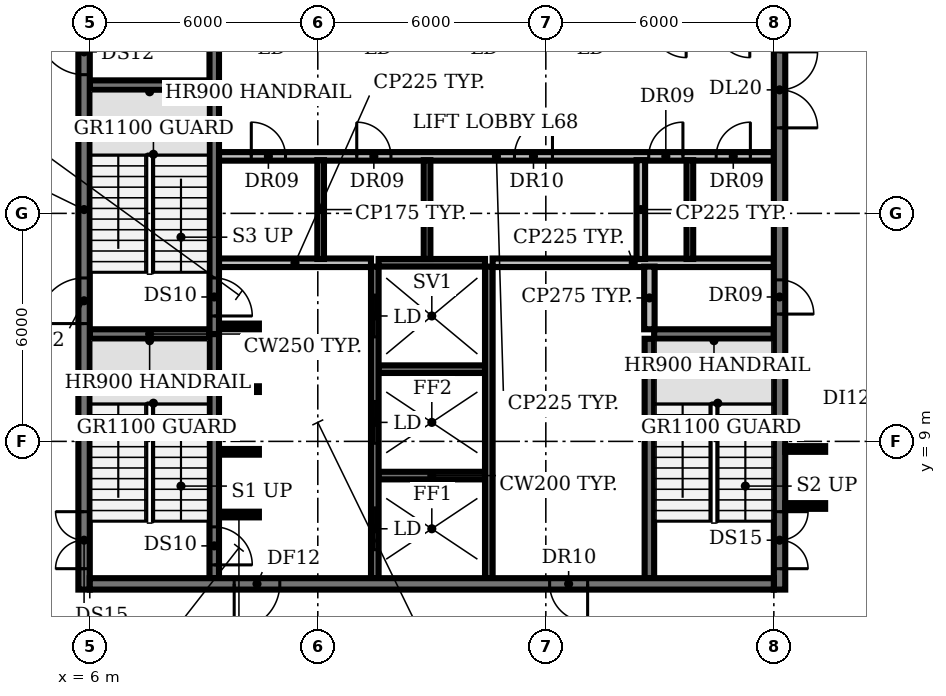
"""IFC4 building model, lengths in metres.
Left out: names, types, materials, properties, quantities, classifications, styles, units other than length and angle.
Written with IfcOpenShell. Run it as: python <this file> out.ifc"""

import sys

from ifc_helpers import new_model, si_unit, direction, frame, frame_2d, origin, place, context, subcontext, project, spatial, rectangle, extrude, element, fill, save


model = new_model("IFC4")
c1 = context("Model", 3, precision=1e-05, world=origin(), true_north=direction((0.0, 1.0)))
c2 = subcontext(c1, "Body", "Model", "MODEL_VIEW")
j1 = project(units=[si_unit("LENGTHUNIT", "METRE"), si_unit("PLANEANGLEUNIT", "RADIAN")], contexts=[c1])
p1 = place(None, origin())
s1 = spatial("IfcSite", under=j1, at=p1, CompositionType="ELEMENT")
p2 = place(p1, origin())
s2 = spatial("IfcBuilding", under=s1, at=p2, CompositionType="ELEMENT")
p3 = place(p2, frame((0.0, 0.0, 306.2)))
s3 = spatial("IfcBuildingStorey", under=s2, at=p3, CompositionType="ELEMENT", Elevation=306.2)
p4 = place(p3, frame((9.4, 7.075, 0.0), z_axis=(0.0, 0.0, 1.0), x_axis=(1.0, 0.0, 0.0)))
e1 = element("IfcWall", 1, at=p4, inside=s3, PredefinedType="SHEAR", context=c2, shape_type="SweptSolid", body=[
    extrude(rectangle(XDim=1.05, YDim=0.15, at=frame_2d((0.525, 0.0))), origin(), (0.0, 0.0, 1.0), 3.85),
])
p5 = place(p3, frame((13.6, 8.1, 0.0), z_axis=(0.0, 0.0, 1.0), x_axis=(1.0, 0.0, 0.0)))
e2 = element("IfcWall", 2, at=p5, inside=s3, PredefinedType="SHEAR", context=c2, shape_type="SweptSolid", body=[
    extrude(rectangle(XDim=2.8, YDim=0.2, at=frame_2d((1.4, 0.0))), origin(), (0.0, 0.0, 1.0), 3.85),
])
for number, where, z_axis, x_axis in (
    (3, (9.4, 8.725, 0.0), (0.0, 0.0, 1.0), (1.0, 0.0, 0.0)),
    (4, (9.4, 10.375, 0.0), (0.0, 0.0, 1.0), (1.0, 0.0, 0.0)),
):
    element("IfcWall", number, at=place(p3, frame(where, z_axis=z_axis, x_axis=x_axis)), inside=s3, PredefinedType="SHEAR", context=c2, shape_type="SweptSolid", body=[
        extrude(rectangle(XDim=1.05, YDim=0.15, at=frame_2d((0.525, 0.0))), origin(), (0.0, 0.0, 1.0), 3.85),
    ])
p6 = place(p3, frame((13.6, 10.9, 0.0), z_axis=(0.0, 0.0, 1.0), x_axis=(1.0, 0.0, 0.0)))
e5 = element("IfcWall", 5, at=p6, inside=s3, PredefinedType="SHEAR", context=c2, shape_type="SweptSolid", body=[
    extrude(rectangle(XDim=2.8, YDim=0.2, at=frame_2d((1.4, 0.0))), origin(), (0.0, 0.0, 1.0), 3.85),
])
for number, where, z_axis, x_axis in (
    (6, (6.0, 11.825, 0.0), (0.0, 0.0, 1.0), (1.0, 0.0, 0.0)),
    (7, (20.85, 11.825, 0.0), (0.0, 0.0, 1.0), (1.0, 0.0, 0.0)),
):
    element("IfcWall", number, at=place(p3, frame(where, z_axis=z_axis, x_axis=x_axis)), inside=s3, PredefinedType="SHEAR", context=c2, shape_type="SweptSolid", body=[
        extrude(rectangle(XDim=3.15, YDim=0.25, at=frame_2d((1.575, 0.0))), origin(), (0.0, 0.0, 1.0), 3.85),
    ])
p7 = place(p3, frame((9.4, 12.025, 0.0), z_axis=(0.0, 0.0, 1.0), x_axis=(1.0, 0.0, 0.0)))
e8 = element("IfcWall", 8, at=p7, inside=s3, PredefinedType="SHEAR", context=c2, shape_type="SweptSolid", body=[
    extrude(rectangle(XDim=1.05, YDim=0.15, at=frame_2d((0.525, 0.0))), origin(), (0.0, 0.0, 1.0), 3.85),
])
p8 = place(p3, frame((9.4, 13.7, 0.0), z_axis=(0.0, 0.0, 1.0), x_axis=(1.0, 0.0, 0.0)))
e9 = element("IfcWall", 9, at=p8, inside=s3, PredefinedType="PARTITIONING", context=c2, shape_type="SweptSolid", body=[
    extrude(rectangle(XDim=4.0, YDim=0.225, at=frame_2d((2.0, 0.0))), origin(), (0.0, 0.0, 1.0), 3.85),
])
p9 = place(p3, frame((13.6, 13.7, 0.0), z_axis=(0.0, 0.0, 1.0), x_axis=(1.0, 0.0, 0.0)))
e10 = element("IfcWall", 10, at=p9, inside=s3, PredefinedType="SHEAR", context=c2, shape_type="SweptSolid", body=[
    extrude(rectangle(XDim=2.8, YDim=0.2, at=frame_2d((1.4, 0.0))), origin(), (0.0, 0.0, 1.0), 3.85),
])
p10 = place(p3, frame((16.6, 13.7, 0.0), z_axis=(0.0, 0.0, 1.0), x_axis=(1.0, 0.0, 0.0)))
e11 = element("IfcWall", 11, at=p10, inside=s3, PredefinedType="PARTITIONING", context=c2, shape_type="SweptSolid", body=[
    extrude(rectangle(XDim=7.4, YDim=0.225, at=frame_2d((3.7, 0.0))), origin(), (0.0, 0.0, 1.0), 3.85),
])
p11 = place(p3, frame((9.4, 16.5, 0.0), z_axis=(0.0, 0.0, 1.0), x_axis=(1.0, 0.0, 0.0)))
e12 = element("IfcWall", 12, at=p11, inside=s3, PredefinedType="PARTITIONING", context=c2, shape_type="SweptSolid", body=[
    extrude(rectangle(XDim=14.6, YDim=0.225, at=frame_2d((7.3, 0.0))), origin(), (0.0, 0.0, 1.0), 3.85),
])
p12 = place(p11, frame((0.85, 0.0, 0.0)))
e13 = element("IfcOpeningElement", 13, at=p12, cuts=e12, PredefinedType="OPENING", context=c2, shape_type="SweptSolid", body=[
    extrude(rectangle(XDim=0.9, YDim=2.1, at=frame_2d((0.45, 1.05))), frame((0.0, 0.123, 0.0), z_axis=(0.0, -1.0, 0.0), x_axis=(1.0, 0.0, 0.0)), (0.0, 0.0, 1.0), 0.245),
])
p13 = place(p11, frame((3.625, 0.0, 0.0)))
e14 = element("IfcOpeningElement", 14, at=p13, cuts=e12, PredefinedType="OPENING", context=c2, shape_type="SweptSolid", body=[
    extrude(rectangle(XDim=0.9, YDim=2.1, at=frame_2d((0.45, 1.05))), frame((0.0, 0.123, 0.0), z_axis=(0.0, -1.0, 0.0), x_axis=(1.0, 0.0, 0.0)), (0.0, 0.0, 1.0), 0.245),
])
p14 = place(p11, frame((7.775, 0.0, 0.0)))
e15 = element("IfcOpeningElement", 15, at=p14, cuts=e12, PredefinedType="OPENING", context=c2, shape_type="SweptSolid", body=[
    extrude(rectangle(XDim=1.0, YDim=2.1, at=frame_2d((0.5, 1.05))), frame((0.0, 0.123, 0.0), z_axis=(0.0, -1.0, 0.0), x_axis=(1.0, 0.0, 0.0)), (0.0, 0.0, 1.0), 0.245),
])
p15 = place(p11, frame((11.308, 0.0, 0.0)))
e16 = element("IfcOpeningElement", 16, at=p15, cuts=e12, PredefinedType="OPENING", context=c2, shape_type="SweptSolid", body=[
    extrude(rectangle(XDim=0.9, YDim=2.1, at=frame_2d((0.45, 1.05))), frame((0.0, 0.123, 0.0), z_axis=(0.0, -1.0, 0.0), x_axis=(1.0, 0.0, 0.0)), (0.0, 0.0, 1.0), 0.245),
])
p16 = place(p11, frame((13.083, 0.0, 0.0)))
e17 = element("IfcOpeningElement", 17, at=p16, cuts=e12, PredefinedType="OPENING", context=c2, shape_type="SweptSolid", body=[
    extrude(rectangle(XDim=0.9, YDim=2.1, at=frame_2d((0.45, 1.05))), frame((0.0, 0.123, 0.0), z_axis=(0.0, -1.0, 0.0), x_axis=(1.0, 0.0, 0.0)), (0.0, 0.0, 1.0), 0.245),
])
p17 = place(p3, frame((6.0, 18.375, 0.0), z_axis=(0.0, 0.0, 1.0), x_axis=(1.0, 0.0, 0.0)))
e18 = element("IfcWall", 18, at=p17, inside=s3, PredefinedType="SHEAR", context=c2, shape_type="SweptSolid", body=[
    extrude(rectangle(XDim=3.15, YDim=0.25, at=frame_2d((1.575, 0.0))), origin(), (0.0, 0.0, 1.0), 3.85),
])
p18 = place(p3, frame((9.275, 11.825, 0.0), z_axis=(0.0, 0.0, 1.0), x_axis=(0.0, -1.0, 0.0)))
e19 = element("IfcWall", 19, at=p18, inside=s3, PredefinedType="SHEAR", context=c2, shape_type="SweptSolid", body=[
    extrude(rectangle(XDim=6.425, YDim=0.25, at=frame_2d((3.212, 0.0))), origin(), (0.0, 0.0, 1.0), 3.85),
])
p19 = place(p18, frame((5.075, 0.0, 0.0)))
e20 = element("IfcOpeningElement", 20, at=p19, cuts=e19, PredefinedType="OPENING", context=c2, shape_type="SweptSolid", body=[
    extrude(rectangle(XDim=1.0, YDim=2.1, at=frame_2d((0.5, 1.05))), frame((0.0, 0.135, 0.0), z_axis=(0.0, -1.0, 0.0), x_axis=(1.0, 0.0, 0.0)), (0.0, 0.0, 1.0), 0.27),
])
p20 = place(p3, frame((9.275, 18.375, 0.0), z_axis=(0.0, 0.0, 1.0), x_axis=(0.0, -1.0, 0.0)))
e21 = element("IfcWall", 21, at=p20, inside=s3, PredefinedType="SHEAR", context=c2, shape_type="SweptSolid", body=[
    extrude(rectangle(XDim=6.55, YDim=0.25, at=frame_2d((3.275, 0.0))), origin(), (0.0, 0.0, 1.0), 3.85),
])
p21 = place(p20, frame((5.075, 0.0, 0.0)))
e22 = element("IfcOpeningElement", 22, at=p21, cuts=e21, PredefinedType="OPENING", context=c2, shape_type="SweptSolid", body=[
    extrude(rectangle(XDim=1.0, YDim=2.1, at=frame_2d((0.5, 1.05))), frame((0.0, 0.135, 0.0), z_axis=(0.0, -1.0, 0.0), x_axis=(1.0, 0.0, 0.0)), (0.0, 0.0, 1.0), 0.27),
])
p22 = place(p3, frame((9.275, 18.375, 0.0), z_axis=(0.0, 0.0, 1.0), x_axis=(0.0, 1.0, 0.0)))
e23 = element("IfcWall", 23, at=p22, inside=s3, PredefinedType="SHEAR", context=c2, shape_type="SweptSolid", body=[
    extrude(rectangle(XDim=6.425, YDim=0.25, at=frame_2d((3.212, 0.0))), origin(), (0.0, 0.0, 1.0), 3.85),
])
p23 = place(p3, frame((12.075, 13.8, 0.0), z_axis=(0.0, 0.0, 1.0), x_axis=(0.0, 1.0, 0.0)))
e24 = element("IfcWall", 24, at=p23, inside=s3, PredefinedType="PARTITIONING", context=c2, shape_type="SweptSolid", body=[
    extrude(rectangle(XDim=2.6, YDim=0.175, at=frame_2d((1.3, 0.0))), origin(), (0.0, 0.0, 1.0), 3.85),
])
p24 = place(p3, frame((13.5, 5.4, 0.0), z_axis=(0.0, 0.0, 1.0), x_axis=(0.0, 1.0, 0.0)))
e25 = element("IfcWall", 25, at=p24, inside=s3, PredefinedType="SHEAR", context=c2, shape_type="SweptSolid", body=[
    extrude(rectangle(XDim=8.2, YDim=0.2, at=frame_2d((4.1, 0.0))), origin(), (0.0, 0.0, 1.0), 3.85),
])
p25 = place(p24, frame((0.75, 0.0, 0.0)))
e26 = element("IfcOpeningElement", 26, at=p25, cuts=e25, PredefinedType="OPENING", context=c2, shape_type="SweptSolid", body=[
    extrude(rectangle(XDim=1.1, YDim=2.1, at=frame_2d((0.55, 1.05))), frame((0.0, 0.11, 0.0), z_axis=(0.0, -1.0, 0.0), x_axis=(1.0, 0.0, 0.0)), (0.0, 0.0, 1.0), 0.22),
])
p26 = place(p24, frame((3.55, 0.0, 0.0)))
e27 = element("IfcOpeningElement", 27, at=p26, cuts=e25, PredefinedType="OPENING", context=c2, shape_type="SweptSolid", body=[
    extrude(rectangle(XDim=1.1, YDim=2.1, at=frame_2d((0.55, 1.05))), frame((0.0, 0.11, 0.0), z_axis=(0.0, -1.0, 0.0), x_axis=(1.0, 0.0, 0.0)), (0.0, 0.0, 1.0), 0.22),
])
p27 = place(p24, frame((6.35, 0.0, 0.0)))
e28 = element("IfcOpeningElement", 28, at=p27, cuts=e25, PredefinedType="OPENING", context=c2, shape_type="SweptSolid", body=[
    extrude(rectangle(XDim=1.1, YDim=2.1, at=frame_2d((0.55, 1.05))), frame((0.0, 0.11, 0.0), z_axis=(0.0, -1.0, 0.0), x_axis=(1.0, 0.0, 0.0)), (0.0, 0.0, 1.0), 0.22),
])
p28 = place(p3, frame((14.875, 13.8, 0.0), z_axis=(0.0, 0.0, 1.0), x_axis=(0.0, 1.0, 0.0)))
e29 = element("IfcWall", 29, at=p28, inside=s3, PredefinedType="PARTITIONING", context=c2, shape_type="SweptSolid", body=[
    extrude(rectangle(XDim=2.6, YDim=0.175, at=frame_2d((1.3, 0.0))), origin(), (0.0, 0.0, 1.0), 3.85),
])
p29 = place(p3, frame((16.5, 5.4, 0.0), z_axis=(0.0, 0.0, 1.0), x_axis=(0.0, 1.0, 0.0)))
e30 = element("IfcWall", 30, at=p29, inside=s3, PredefinedType="SHEAR", context=c2, shape_type="SweptSolid", body=[
    extrude(rectangle(XDim=8.2, YDim=0.2, at=frame_2d((4.1, 0.0))), origin(), (0.0, 0.0, 1.0), 3.85),
])
p30 = place(p3, frame((20.5, 13.8, 0.0), z_axis=(0.0, 0.0, 1.0), x_axis=(0.0, 1.0, 0.0)))
e31 = element("IfcWall", 31, at=p30, inside=s3, PredefinedType="PARTITIONING", context=c2, shape_type="SweptSolid", body=[
    extrude(rectangle(XDim=2.6, YDim=0.225, at=frame_2d((1.3, 0.0))), origin(), (0.0, 0.0, 1.0), 3.85),
])
p31 = place(p3, frame((20.725, 5.4, 0.0), z_axis=(0.0, 0.0, 1.0), x_axis=(0.0, 1.0, 0.0)))
e32 = element("IfcWall", 32, at=p31, inside=s3, PredefinedType="SHEAR", context=c2, shape_type="SweptSolid", body=[
    extrude(rectangle(XDim=6.3, YDim=0.25, at=frame_2d((3.15, 0.0))), origin(), (0.0, 0.0, 1.0), 3.85),
])
p32 = place(p3, frame((20.725, 11.95, 0.0), z_axis=(0.0, 0.0, 1.0), x_axis=(0.0, 1.0, 0.0)))
e33 = element("IfcWall", 33, at=p32, inside=s3, PredefinedType="PARTITIONING", context=c2, shape_type="SweptSolid", body=[
    extrude(rectangle(XDim=1.65, YDim=0.275, at=frame_2d((0.825, 0.0))), origin(), (0.0, 0.0, 1.0), 3.85),
])
p33 = place(p3, frame((21.79, 13.8, 0.0), z_axis=(0.0, 0.0, 1.0), x_axis=(0.0, 1.0, 0.0)))
e34 = element("IfcWall", 34, at=p33, inside=s3, PredefinedType="PARTITIONING", context=c2, shape_type="SweptSolid", body=[
    extrude(rectangle(XDim=2.6, YDim=0.175, at=frame_2d((1.3, 0.0))), origin(), (0.0, 0.0, 1.0), 3.85),
])
p34 = place(p3, frame((5.85, 5.1, 0.0), z_axis=(0.0, 0.0, 1.0), x_axis=(0.0, 1.0, 0.0)))
e35 = element("IfcWall", 35, at=p34, inside=s3, PredefinedType="SHEAR", context=c2, shape_type="SweptSolid", body=[
    extrude(rectangle(XDim=20.0, YDim=0.3, at=frame_2d((10.0, 0.0))), origin(), (0.0, 0.0, 1.0), 3.85),
])
p35 = place(p34, frame((0.55, 0.0, 0.0)))
e36 = element("IfcOpeningElement", 36, at=p35, cuts=e35, PredefinedType="OPENING", context=c2, shape_type="SweptSolid", body=[
    extrude(rectangle(XDim=1.5, YDim=2.1, at=frame_2d((0.75, 1.05))), frame((0.0, 0.16, 0.0), z_axis=(0.0, -1.0, 0.0), x_axis=(1.0, 0.0, 0.0)), (0.0, 0.0, 1.0), 0.32),
])
p36 = place(p34, frame((7.0, 0.0, 0.0)))
e37 = element("IfcOpeningElement", 37, at=p36, cuts=e35, PredefinedType="OPENING", context=c2, shape_type="SweptSolid", body=[
    extrude(rectangle(XDim=1.2, YDim=2.1, at=frame_2d((0.6, 1.05))), frame((0.0, 0.16, 0.0), z_axis=(0.0, -1.0, 0.0), x_axis=(1.0, 0.0, 0.0)), (0.0, 0.0, 1.0), 0.32),
])
p37 = place(p34, frame((13.55, 0.0, 0.0)))
e38 = element("IfcOpeningElement", 38, at=p37, cuts=e35, PredefinedType="OPENING", context=c2, shape_type="SweptSolid", body=[
    extrude(rectangle(XDim=1.2, YDim=2.1, at=frame_2d((0.6, 1.05))), frame((0.0, 0.16, 0.0), z_axis=(0.0, -1.0, 0.0), x_axis=(1.0, 0.0, 0.0)), (0.0, 0.0, 1.0), 0.32),
])
p38 = place(p3, frame((24.15, 25.655, 0.0), z_axis=(0.0, 0.0, 1.0), x_axis=(0.0, -1.0, 0.0)))
e39 = element("IfcWall", 39, at=p38, inside=s3, PredefinedType="SHEAR", context=c2, shape_type="SweptSolid", body=[
    extrude(rectangle(XDim=20.555, YDim=0.3, at=frame_2d((10.277, 0.0))), origin(), (0.0, 0.0, 1.0), 3.85),
])
p39 = place(p38, frame((18.505, 0.0, 0.0)))
e40 = element("IfcOpeningElement", 40, at=p39, cuts=e39, PredefinedType="OPENING", context=c2, shape_type="SweptSolid", body=[
    extrude(rectangle(XDim=1.5, YDim=2.1, at=frame_2d((0.75, 1.05))), frame((0.0, 0.16, 0.0), z_axis=(0.0, -1.0, 0.0), x_axis=(1.0, 0.0, 0.0)), (0.0, 0.0, 1.0), 0.32),
])
p40 = place(p38, frame((12.405, 0.0, 0.0)))
e41 = element("IfcOpeningElement", 41, at=p40, cuts=e39, PredefinedType="OPENING", context=c2, shape_type="SweptSolid", body=[
    extrude(rectangle(XDim=0.9, YDim=2.1, at=frame_2d((0.45, 1.05))), frame((0.0, 0.16, 0.0), z_axis=(0.0, -1.0, 0.0), x_axis=(1.0, 0.0, 0.0)), (0.0, 0.0, 1.0), 0.32),
])
p41 = place(p38, frame((6.405, 0.0, 0.0)))
e42 = element("IfcOpeningElement", 42, at=p41, cuts=e39, PredefinedType="OPENING", context=c2, shape_type="SweptSolid", body=[
    extrude(rectangle(XDim=2.0, YDim=2.1, at=frame_2d((1.0, 1.05))), frame((0.0, 0.16, 0.0), z_axis=(0.0, -1.0, 0.0), x_axis=(1.0, 0.0, 0.0)), (0.0, 0.0, 1.0), 0.32),
])
p42 = place(p3, frame((24.0, 5.25, 0.0), z_axis=(0.0, 0.0, 1.0), x_axis=(-1.0, 0.0, 0.0)))
e43 = element("IfcWall", 43, at=p42, inside=s3, PredefinedType="SHEAR", context=c2, shape_type="SweptSolid", body=[
    extrude(rectangle(XDim=18.0, YDim=0.3, at=frame_2d((9.0, 0.0))), origin(), (0.0, 0.0, 1.0), 3.85),
])
p43 = place(p42, frame((13.0, 0.0, 0.0)))
e44 = element("IfcOpeningElement", 44, at=p43, cuts=e43, PredefinedType="OPENING", context=c2, shape_type="SweptSolid", body=[
    extrude(rectangle(XDim=1.2, YDim=2.1, at=frame_2d((0.6, 1.05))), frame((0.0, 0.16, 0.0), z_axis=(0.0, -1.0, 0.0), x_axis=(1.0, 0.0, 0.0)), (0.0, 0.0, 1.0), 0.32),
])
p44 = place(p42, frame((4.9, 0.0, 0.0)))
e45 = element("IfcOpeningElement", 45, at=p44, cuts=e43, PredefinedType="OPENING", context=c2, shape_type="SweptSolid", body=[
    extrude(rectangle(XDim=1.0, YDim=2.1, at=frame_2d((0.5, 1.05))), frame((0.0, 0.16, 0.0), z_axis=(0.0, -1.0, 0.0), x_axis=(1.0, 0.0, 0.0)), (0.0, 0.0, 1.0), 0.32),
])
for number, where, z_axis, x_axis in (
    (46, (24.3, 7.3, 0.0), (0.0, 0.0, 1.0), (1.0, 0.0, 0.0)),
    (47, (24.3, 8.8, 0.0), (0.0, 0.0, 1.0), (1.0, 0.0, 0.0)),
):
    element("IfcWall", number, at=place(p3, frame(where, z_axis=z_axis, x_axis=x_axis)), inside=s3, PredefinedType="PARTITIONING", context=c2, shape_type="SweptSolid", body=[
        extrude(rectangle(XDim=1.05, YDim=0.15, at=frame_2d((0.525, 0.0))), origin(), (0.0, 0.0, 1.0), 2.9),
    ])
p45 = place(p12, origin())
e48 = element("IfcDoor", 48, at=p45, inside=s3, OperationType="SINGLE_SWING_LEFT", PredefinedType="DOOR", context=c2, shape_type="SweptSolid", body=[
    extrude(rectangle(XDim=0.9, YDim=2.1, at=frame_2d((0.45, 1.05))), frame((0.0, 0.025, 0.0), z_axis=(0.0, -1.0, 0.0), x_axis=(1.0, 0.0, 0.0)), (0.0, 0.0, 1.0), 0.05),
])
fill(e13, e48)
p46 = place(p13, origin())
e49 = element("IfcDoor", 49, at=p46, inside=s3, OperationType="SINGLE_SWING_LEFT", PredefinedType="DOOR", context=c2, shape_type="SweptSolid", body=[
    extrude(rectangle(XDim=0.9, YDim=2.1, at=frame_2d((0.45, 1.05))), frame((0.0, 0.025, 0.0), z_axis=(0.0, -1.0, 0.0), x_axis=(1.0, 0.0, 0.0)), (0.0, 0.0, 1.0), 0.05),
])
fill(e14, e49)
p47 = place(p14, origin())
e50 = element("IfcDoor", 50, at=p47, inside=s3, OperationType="SINGLE_SWING_RIGHT", PredefinedType="DOOR", context=c2, shape_type="SweptSolid", body=[
    extrude(rectangle(XDim=1.0, YDim=2.1, at=frame_2d((0.5, 1.05))), frame((0.0, 0.025, 0.0), z_axis=(0.0, -1.0, 0.0), x_axis=(1.0, 0.0, 0.0)), (0.0, 0.0, 1.0), 0.05),
])
fill(e15, e50)
p48 = place(p15, origin())
e51 = element("IfcDoor", 51, at=p48, inside=s3, OperationType="SINGLE_SWING_RIGHT", PredefinedType="DOOR", context=c2, shape_type="SweptSolid", body=[
    extrude(rectangle(XDim=0.9, YDim=2.1, at=frame_2d((0.45, 1.05))), frame((0.0, 0.025, 0.0), z_axis=(0.0, -1.0, 0.0), x_axis=(1.0, 0.0, 0.0)), (0.0, 0.0, 1.0), 0.05),
])
fill(e16, e51)
p49 = place(p16, origin())
e52 = element("IfcDoor", 52, at=p49, inside=s3, OperationType="SINGLE_SWING_RIGHT", PredefinedType="DOOR", context=c2, shape_type="SweptSolid", body=[
    extrude(rectangle(XDim=0.9, YDim=2.1, at=frame_2d((0.45, 1.05))), frame((0.0, 0.025, 0.0), z_axis=(0.0, -1.0, 0.0), x_axis=(1.0, 0.0, 0.0)), (0.0, 0.0, 1.0), 0.05),
])
fill(e17, e52)
p50 = place(p19, origin())
e53 = element("IfcDoor", 53, at=p50, inside=s3, OperationType="SINGLE_SWING_RIGHT", PredefinedType="DOOR", context=c2, shape_type="SweptSolid", body=[
    extrude(rectangle(XDim=1.0, YDim=2.1, at=frame_2d((0.5, 1.05))), frame((0.0, 0.025, 0.0), z_axis=(0.0, -1.0, 0.0), x_axis=(1.0, 0.0, 0.0)), (0.0, 0.0, 1.0), 0.05),
])
fill(e20, e53)
p51 = place(p21, origin())
e54 = element("IfcDoor", 54, at=p51, inside=s3, OperationType="SINGLE_SWING_RIGHT", PredefinedType="DOOR", context=c2, shape_type="SweptSolid", body=[
    extrude(rectangle(XDim=1.0, YDim=2.1, at=frame_2d((0.5, 1.05))), frame((0.0, 0.025, 0.0), z_axis=(0.0, -1.0, 0.0), x_axis=(1.0, 0.0, 0.0)), (0.0, 0.0, 1.0), 0.05),
])
fill(e22, e54)
p52 = place(p25, origin())
e55 = element("IfcDoor", 55, at=p52, inside=s3, OperationType="DOUBLE_DOOR_SLIDING", PredefinedType="DOOR", context=c2, shape_type="SweptSolid", body=[
    extrude(rectangle(XDim=1.1, YDim=2.1, at=frame_2d((0.55, 1.05))), frame((0.0, 0.025, 0.0), z_axis=(0.0, -1.0, 0.0), x_axis=(1.0, 0.0, 0.0)), (0.0, 0.0, 1.0), 0.05),
])
fill(e26, e55)
p53 = place(p26, origin())
e56 = element("IfcDoor", 56, at=p53, inside=s3, OperationType="DOUBLE_DOOR_SLIDING", PredefinedType="DOOR", context=c2, shape_type="SweptSolid", body=[
    extrude(rectangle(XDim=1.1, YDim=2.1, at=frame_2d((0.55, 1.05))), frame((0.0, 0.025, 0.0), z_axis=(0.0, -1.0, 0.0), x_axis=(1.0, 0.0, 0.0)), (0.0, 0.0, 1.0), 0.05),
])
fill(e27, e56)
p54 = place(p27, origin())
e57 = element("IfcDoor", 57, at=p54, inside=s3, OperationType="DOUBLE_DOOR_SLIDING", PredefinedType="DOOR", context=c2, shape_type="SweptSolid", body=[
    extrude(rectangle(XDim=1.1, YDim=2.1, at=frame_2d((0.55, 1.05))), frame((0.0, 0.025, 0.0), z_axis=(0.0, -1.0, 0.0), x_axis=(1.0, 0.0, 0.0)), (0.0, 0.0, 1.0), 0.05),
])
fill(e28, e57)
p55 = place(p35, origin())
e58 = element("IfcDoor", 58, at=p55, inside=s3, OperationType="DOUBLE_DOOR_SINGLE_SWING", PredefinedType="DOOR", context=c2, shape_type="SweptSolid", body=[
    extrude(rectangle(XDim=1.5, YDim=2.1, at=frame_2d((0.75, 1.05))), frame((0.0, 0.025, 0.0), z_axis=(0.0, -1.0, 0.0), x_axis=(1.0, 0.0, 0.0)), (0.0, 0.0, 1.0), 0.05),
])
fill(e36, e58)
p56 = place(p36, origin())
e59 = element("IfcDoor", 59, at=p56, inside=s3, OperationType="SINGLE_SWING_LEFT", PredefinedType="DOOR", context=c2, shape_type="SweptSolid", body=[
    extrude(rectangle(XDim=1.2, YDim=2.1, at=frame_2d((0.6, 1.05))), frame((0.0, 0.025, 0.0), z_axis=(0.0, -1.0, 0.0), x_axis=(1.0, 0.0, 0.0)), (0.0, 0.0, 1.0), 0.05),
])
fill(e37, e59)
p57 = place(p37, origin())
e60 = element("IfcDoor", 60, at=p57, inside=s3, OperationType="SINGLE_SWING_RIGHT", PredefinedType="DOOR", context=c2, shape_type="SweptSolid", body=[
    extrude(rectangle(XDim=1.2, YDim=2.1, at=frame_2d((0.6, 1.05))), frame((0.0, 0.025, 0.0), z_axis=(0.0, -1.0, 0.0), x_axis=(1.0, 0.0, 0.0)), (0.0, 0.0, 1.0), 0.05),
])
fill(e38, e60)
p58 = place(p39, origin())
e61 = element("IfcDoor", 61, at=p58, inside=s3, OperationType="DOUBLE_DOOR_SINGLE_SWING", PredefinedType="DOOR", context=c2, shape_type="SweptSolid", body=[
    extrude(rectangle(XDim=1.5, YDim=2.1, at=frame_2d((0.75, 1.05))), frame((0.0, 0.025, 0.0), z_axis=(0.0, -1.0, 0.0), x_axis=(1.0, 0.0, 0.0)), (0.0, 0.0, 1.0), 0.05),
])
fill(e40, e61)
p59 = place(p40, origin())
e62 = element("IfcDoor", 62, at=p59, inside=s3, OperationType="SINGLE_SWING_RIGHT", PredefinedType="DOOR", context=c2, shape_type="SweptSolid", body=[
    extrude(rectangle(XDim=0.9, YDim=2.1, at=frame_2d((0.45, 1.05))), frame((0.0, 0.025, 0.0), z_axis=(0.0, -1.0, 0.0), x_axis=(1.0, 0.0, 0.0)), (0.0, 0.0, 1.0), 0.05),
])
fill(e41, e62)
p60 = place(p41, origin())
e63 = element("IfcDoor", 63, at=p60, inside=s3, OperationType="DOUBLE_DOOR_SINGLE_SWING", PredefinedType="DOOR", context=c2, shape_type="SweptSolid", body=[
    extrude(rectangle(XDim=2.0, YDim=2.1, at=frame_2d((1.0, 1.05))), frame((0.0, 0.025, 0.0), z_axis=(0.0, -1.0, 0.0), x_axis=(1.0, 0.0, 0.0)), (0.0, 0.0, 1.0), 0.05),
])
fill(e42, e63)
p61 = place(p43, origin())
e64 = element("IfcDoor", 64, at=p61, inside=s3, OperationType="SINGLE_SWING_RIGHT", PredefinedType="DOOR", context=c2, shape_type="SweptSolid", body=[
    extrude(rectangle(XDim=1.2, YDim=2.1, at=frame_2d((0.6, 1.05))), frame((0.0, 0.025, 0.0), z_axis=(0.0, -1.0, 0.0), x_axis=(1.0, 0.0, 0.0)), (0.0, 0.0, 1.0), 0.05),
])
fill(e44, e64)
p62 = place(p44, origin())
e65 = element("IfcDoor", 65, at=p62, inside=s3, OperationType="SINGLE_SWING_LEFT", PredefinedType="DOOR", context=c2, shape_type="SweptSolid", body=[
    extrude(rectangle(XDim=1.0, YDim=2.1, at=frame_2d((0.5, 1.05))), frame((0.0, 0.025, 0.0), z_axis=(0.0, -1.0, 0.0), x_axis=(1.0, 0.0, 0.0)), (0.0, 0.0, 1.0), 0.05),
])
fill(e45, e65)
save(model, sys.argv[1])
